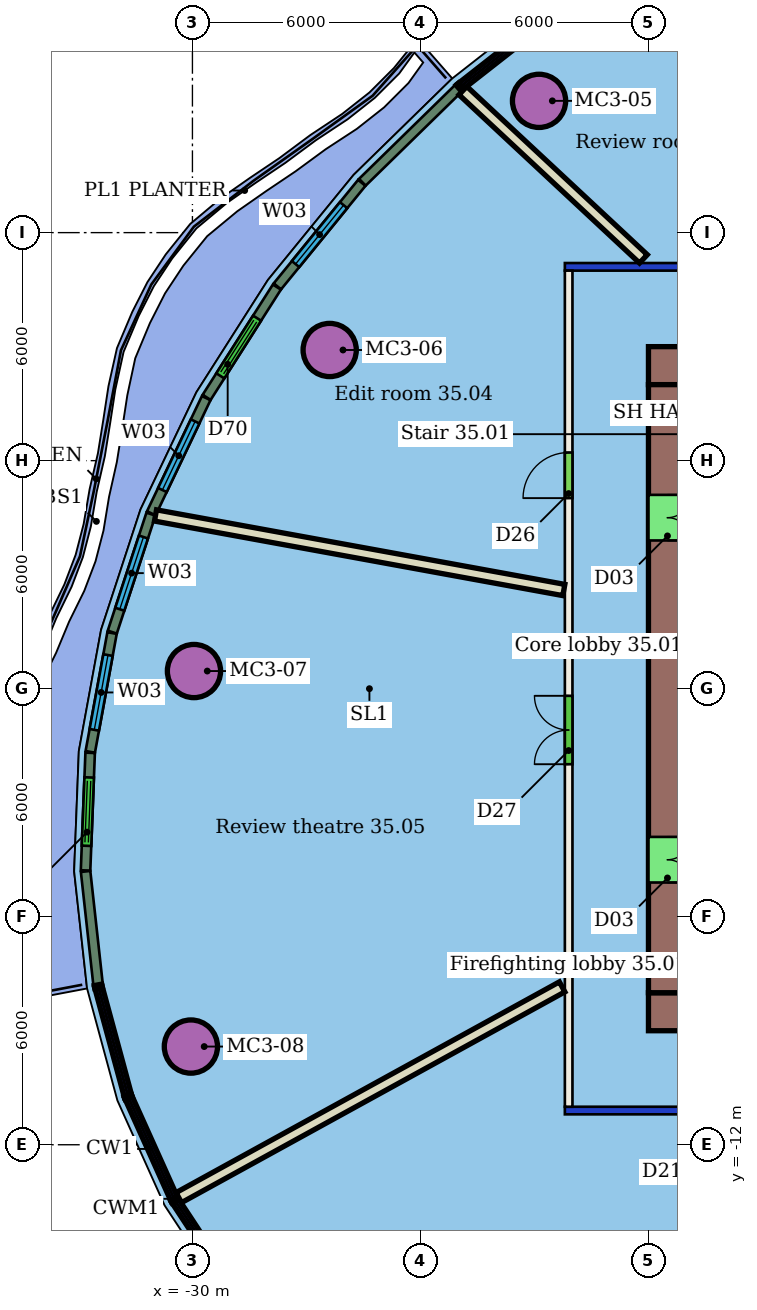
"""IFC4 building model, lengths in metres.
Left out: names, types, materials, properties, quantities, classifications, styles, units other than length and angle.
Written with IfcOpenShell. Run it as: python <this file> out.ifc"""

import sys

from ifc_helpers import new_model, si_unit, direction, frame, frame_2d, origin, origin_2d, place, context, subcontext, project, spatial, rectangle, hollow_circle, extrude, element, fill, save


model = new_model("IFC4")
c1 = context("Model", 3, precision=1e-05, world=origin(), true_north=direction((0.0, 1.0)))
c2 = subcontext(c1, "Body", "Model", "MODEL_VIEW")
j1 = project(units=[si_unit("LENGTHUNIT", "METRE"), si_unit("PLANEANGLEUNIT", "RADIAN")], contexts=[c1])
p1 = place(None, origin())
s1 = spatial("IfcSite", under=j1, at=p1, CompositionType="ELEMENT")
p2 = place(p1, origin())
s2 = spatial("IfcBuilding", under=s1, at=p2, CompositionType="ELEMENT")
p3 = place(p2, frame((0.0, 0.0, 150.6)))
s3 = spatial("IfcBuildingStorey", under=s2, at=p3, CompositionType="ELEMENT", Elevation=150.6)
for number, where, z_axis, x_axis in (
    (1, (-20.879, 15.467, 0.0), (0.0, 0.0, 1.0), (1.0, 0.0, 0.0)),
    (2, (-26.388, 8.912, 0.0), (0.0, 0.0, 1.0), (1.0, 0.0, 0.0)),
    (3, (-29.959, 0.464, 0.0), (0.0, 0.0, 1.0), (1.0, 0.0, 0.0)),
    (4, (-30.041, -9.417, 0.0), (0.0, 0.0, 1.0), (1.0, 0.0, 0.0)),
):
    element("IfcColumn", number, at=place(p3, frame(where, z_axis=z_axis, x_axis=x_axis)), inside=s3, PredefinedType="COLUMN", context=c2, shape_type="SweptSolid", body=[
        extrude(hollow_circle(Radius=0.7, WallThickness=0.05, at=origin_2d()), origin(), (0.0, 0.0, 1.0), 3.45),
    ])
p4 = place(p3, frame((8.2, -11.1, 0.0), z_axis=(0.0, 0.0, 1.0), x_axis=(-1.0, 0.0, 0.0)))
e5 = element("IfcWall", 5, at=p4, inside=s3, PredefinedType="PARTITIONING", context=c2, shape_type="SweptSolid", body=[
    extrude(rectangle(XDim=28.4, YDim=0.2, at=frame_2d((14.2, 0.0))), origin(), (0.0, 0.0, 1.0), 3.05),
])
p5 = place(p4, frame((22.505, 0.0, 0.0)))
e6 = element("IfcOpeningElement", 6, at=p5, cuts=e5, PredefinedType="OPENING", context=c2, shape_type="SweptSolid", body=[
    extrude(rectangle(XDim=1.8, YDim=2.1, at=frame_2d((0.9, 1.05))), frame((0.0, 0.11, 0.0), z_axis=(0.0, -1.0, 0.0), x_axis=(1.0, 0.0, 0.0)), (0.0, 0.0, 1.0), 0.22),
])
p6 = place(p4, frame((17.127, 0.0, 0.0)))
e7 = element("IfcOpeningElement", 7, at=p6, cuts=e5, PredefinedType="OPENING", context=c2, shape_type="SweptSolid", body=[
    extrude(rectangle(XDim=0.9, YDim=2.1, at=frame_2d((0.45, 1.05))), frame((0.0, 0.11, 0.0), z_axis=(0.0, -1.0, 0.0), x_axis=(1.0, 0.0, 0.0)), (0.0, 0.0, 1.0), 0.22),
])
p7 = place(p4, frame((7.291, 0.0, 0.0)))
e8 = element("IfcOpeningElement", 8, at=p7, cuts=e5, PredefinedType="OPENING", context=c2, shape_type="SweptSolid", body=[
    extrude(rectangle(XDim=1.2, YDim=2.1, at=frame_2d((0.6, 1.05))), frame((0.0, 0.11, 0.0), z_axis=(0.0, -1.0, 0.0), x_axis=(1.0, 0.0, 0.0)), (0.0, 0.0, 1.0), 0.22),
])
p8 = place(p3, frame((-20.1, -11.0, 0.0), z_axis=(0.0, 0.0, 1.0), x_axis=(0.0, 1.0, 0.0)))
e9 = element("IfcWall", 9, at=p8, inside=s3, PredefinedType="PARTITIONING", context=c2, shape_type="SweptSolid", body=[
    extrude(rectangle(XDim=22.0, YDim=0.2, at=frame_2d((11.0, 0.0))), origin(), (0.0, 0.0, 1.0), 3.45),
])
p9 = place(p8, frame((16.014, 0.0, 0.0)))
e10 = element("IfcOpeningElement", 10, at=p9, cuts=e9, PredefinedType="OPENING", context=c2, shape_type="SweptSolid", body=[
    extrude(rectangle(XDim=1.2, YDim=2.1, at=frame_2d((0.6, 1.05))), frame((0.0, 0.11, 0.0), z_axis=(0.0, -1.0, 0.0), x_axis=(1.0, 0.0, 0.0)), (0.0, 0.0, 1.0), 0.22),
])
p10 = place(p8, frame((9.012, 0.0, 0.0)))
e11 = element("IfcOpeningElement", 11, at=p10, cuts=e9, PredefinedType="OPENING", context=c2, shape_type="SweptSolid", body=[
    extrude(rectangle(XDim=1.8, YDim=2.4, at=frame_2d((0.9, 1.2))), frame((0.0, 0.11, 0.0), z_axis=(0.0, -1.0, 0.0), x_axis=(1.0, 0.0, 0.0)), (0.0, 0.0, 1.0), 0.22),
])
p11 = place(p3, frame((-20.2, 11.1, 0.0), z_axis=(0.0, 0.0, 1.0), x_axis=(1.0, 0.0, 0.0)))
e12 = element("IfcWall", 12, at=p11, inside=s3, PredefinedType="PARTITIONING", context=c2, shape_type="SweptSolid", body=[
    extrude(rectangle(XDim=28.4, YDim=0.2, at=frame_2d((14.2, 0.0))), origin(), (0.0, 0.0, 1.0), 3.05),
])
p12 = place(p11, frame((20.358, 0.0, 0.0)))
e13 = element("IfcOpeningElement", 13, at=p12, cuts=e12, PredefinedType="OPENING", context=c2, shape_type="SweptSolid", body=[
    extrude(rectangle(XDim=1.1, YDim=2.1, at=frame_2d((0.55, 1.05))), frame((0.0, 0.11, 0.0), z_axis=(0.0, -1.0, 0.0), x_axis=(1.0, 0.0, 0.0)), (0.0, 0.0, 1.0), 0.22),
])
p13 = place(p11, frame((10.659, 0.0, 0.0)))
e14 = element("IfcOpeningElement", 14, at=p13, cuts=e12, PredefinedType="OPENING", context=c2, shape_type="SweptSolid", body=[
    extrude(rectangle(XDim=1.0, YDim=2.1, at=frame_2d((0.5, 1.05))), frame((0.0, 0.11, 0.0), z_axis=(0.0, -1.0, 0.0), x_axis=(1.0, 0.0, 0.0)), (0.0, 0.0, 1.0), 0.22),
])
p14 = place(p11, frame((5.245, 0.0, 0.0)))
e15 = element("IfcOpeningElement", 15, at=p14, cuts=e12, PredefinedType="OPENING", context=c2, shape_type="SweptSolid", body=[
    extrude(rectangle(XDim=1.2, YDim=2.1, at=frame_2d((0.6, 1.05))), frame((0.0, 0.11, 0.0), z_axis=(0.0, -1.0, 0.0), x_axis=(1.0, 0.0, 0.0)), (0.0, 0.0, 1.0), 0.22),
])
p15 = place(p3, frame((-22.883, 15.737, 0.0), z_axis=(0.0, 0.0, 1.0), x_axis=(0.731506509166, -0.681834457217, 0.0)))
e16 = element("IfcWall", 16, at=p15, inside=s3, PredefinedType="PARTITIONING", context=c2, shape_type="SweptSolid", body=[
    extrude(rectangle(XDim=6.493, YDim=0.3, at=frame_2d((3.246, 0.0))), origin(), (0.0, 0.0, 1.0), 3.45),
])
p16 = place(p3, frame((-30.972, 4.558, 0.0), z_axis=(0.0, 0.0, 1.0), x_axis=(0.983747727231, -0.179556144892, 0.0)))
e17 = element("IfcWall", 17, at=p16, inside=s3, PredefinedType="PARTITIONING", context=c2, shape_type="SweptSolid", body=[
    extrude(rectangle(XDim=10.922, YDim=0.3, at=frame_2d((5.461, 0.0))), origin(), (0.0, 0.0, 1.0), 3.45),
])
p17 = place(p3, frame((-30.359, -13.392, 0.0), z_axis=(0.0, 0.0, 1.0), x_axis=(0.876308586889, 0.481750205547, 0.0)))
e18 = element("IfcWall", 18, at=p17, inside=s3, PredefinedType="PARTITIONING", context=c2, shape_type="SweptSolid", body=[
    extrude(rectangle(XDim=11.511, YDim=0.3, at=frame_2d((5.755, 0.0))), origin(), (0.0, 0.0, 1.0), 3.45),
])
p18 = place(p3, frame((-18.707, -22.72, 0.0), z_axis=(0.0, 0.0, 1.0), x_axis=(0.488112856121, 0.872780522061, 0.0)))
e19 = element("IfcWall", 19, at=p18, inside=s3, PredefinedType="PARTITIONING", context=c2, shape_type="SweptSolid", body=[
    extrude(rectangle(XDim=13.157, YDim=0.15, at=frame_2d((6.579, 0.0))), origin(), (0.0, 0.0, 1.0), 3.45),
])
p19 = place(p3, frame((-23.005, 15.792, 0.0), z_axis=(0.0, 0.0, 1.0), x_axis=(-0.715154193922, -0.698966722324, 0.0)))
e20 = element("IfcWall", 20, at=p19, inside=s3, PredefinedType="SOLIDWALL", context=c2, shape_type="SweptSolid", body=[
    extrude(rectangle(XDim=3.529, YDim=0.25, at=frame_2d((1.765, 0.0))), origin(), (0.0, 0.0, 1.0), 3.1),
])
p20 = place(p3, frame((-25.543, 13.31, 0.0), z_axis=(0.0, 0.0, 1.0), x_axis=(-0.631962066668, -0.774999320188, 0.0)))
e21 = element("IfcWall", 21, at=p20, inside=s3, PredefinedType="SOLIDWALL", context=c2, shape_type="SweptSolid", body=[
    extrude(rectangle(XDim=3.514, YDim=0.25, at=frame_2d((1.757, 0.0))), origin(), (0.0, 0.0, 1.0), 3.1),
])
p21 = place(p20, frame((0.757, 0.0, 0.9)))
e22 = element("IfcOpeningElement", 22, at=p21, cuts=e21, PredefinedType="OPENING", context=c2, shape_type="SweptSolid", body=[
    extrude(rectangle(XDim=2.0, YDim=2.1, at=frame_2d((1.0, 1.05))), frame((0.0, 0.135, 0.0), z_axis=(0.0, -1.0, 0.0), x_axis=(1.0, 0.0, 0.0)), (0.0, 0.0, 1.0), 0.27),
])
p22 = place(p3, frame((-27.778, 10.568, 0.0), z_axis=(0.0, 0.0, 1.0), x_axis=(-0.537256497047, -0.843418909191, 0.0)))
e23 = element("IfcWall", 23, at=p22, inside=s3, PredefinedType="SOLIDWALL", context=c2, shape_type="SweptSolid", body=[
    extrude(rectangle(XDim=3.441, YDim=0.25, at=frame_2d((1.72, 0.0))), origin(), (0.0, 0.0, 1.0), 3.1),
])
p23 = place(p22, frame((0.97, 0.0, 0.0)))
e24 = element("IfcOpeningElement", 24, at=p23, cuts=e23, PredefinedType="OPENING", context=c2, shape_type="SweptSolid", body=[
    extrude(rectangle(XDim=1.8, YDim=2.4, at=frame_2d((0.9, 1.2))), frame((0.0, 0.135, 0.0), z_axis=(0.0, -1.0, 0.0), x_axis=(1.0, 0.0, 0.0)), (0.0, 0.0, 1.0), 0.27),
])
p24 = place(p3, frame((-29.638, 7.645, 0.0), z_axis=(0.0, 0.0, 1.0), x_axis=(-0.430495314567, -0.902592811923, 0.0)))
e25 = element("IfcWall", 25, at=p24, inside=s3, PredefinedType="SOLIDWALL", context=c2, shape_type="SweptSolid", body=[
    extrude(rectangle(XDim=3.357, YDim=0.25, at=frame_2d((1.678, 0.0))), origin(), (0.0, 0.0, 1.0), 3.1),
])
p25 = place(p24, frame((0.678, 0.0, 0.9)))
e26 = element("IfcOpeningElement", 26, at=p25, cuts=e25, PredefinedType="OPENING", context=c2, shape_type="SweptSolid", body=[
    extrude(rectangle(XDim=2.0, YDim=2.1, at=frame_2d((1.0, 1.05))), frame((0.0, 0.135, 0.0), z_axis=(0.0, -1.0, 0.0), x_axis=(1.0, 0.0, 0.0)), (0.0, 0.0, 1.0), 0.27),
])
p26 = place(p3, frame((-31.092, 4.593, 0.0), z_axis=(0.0, 0.0, 1.0), x_axis=(-0.311426794422, -0.950270146704, 0.0)))
e27 = element("IfcWall", 27, at=p26, inside=s3, PredefinedType="SOLIDWALL", context=c2, shape_type="SweptSolid", body=[
    extrude(rectangle(XDim=3.268, YDim=0.25, at=frame_2d((1.634, 0.0))), origin(), (0.0, 0.0, 1.0), 3.1),
])
p27 = place(p26, frame((0.634, 0.0, 0.9)))
e28 = element("IfcOpeningElement", 28, at=p27, cuts=e27, PredefinedType="OPENING", context=c2, shape_type="SweptSolid", body=[
    extrude(rectangle(XDim=2.0, YDim=2.1, at=frame_2d((1.0, 1.05))), frame((0.0, 0.135, 0.0), z_axis=(0.0, -1.0, 0.0), x_axis=(1.0, 0.0, 0.0)), (0.0, 0.0, 1.0), 0.27),
])
p28 = place(p3, frame((-32.115, 1.464, 0.0), z_axis=(0.0, 0.0, 1.0), x_axis=(-0.18041951624, -0.983589750943, 0.0)))
e29 = element("IfcWall", 29, at=p28, inside=s3, PredefinedType="SOLIDWALL", context=c2, shape_type="SweptSolid", body=[
    extrude(rectangle(XDim=3.179, YDim=0.25, at=frame_2d((1.589, 0.0))), origin(), (0.0, 0.0, 1.0), 3.1),
])
p29 = place(p28, frame((0.589, 0.0, 0.9)))
e30 = element("IfcOpeningElement", 30, at=p29, cuts=e29, PredefinedType="OPENING", context=c2, shape_type="SweptSolid", body=[
    extrude(rectangle(XDim=2.0, YDim=2.1, at=frame_2d((1.0, 1.05))), frame((0.0, 0.135, 0.0), z_axis=(0.0, -1.0, 0.0), x_axis=(1.0, 0.0, 0.0)), (0.0, 0.0, 1.0), 0.27),
])
p30 = place(p3, frame((-32.691, -1.688, 0.0), z_axis=(0.0, 0.0, 1.0), x_axis=(-0.039102222246, -0.99923521566, 0.0)))
e31 = element("IfcWall", 31, at=p30, inside=s3, PredefinedType="SOLIDWALL", context=c2, shape_type="SweptSolid", body=[
    extrude(rectangle(XDim=3.097, YDim=0.25, at=frame_2d((1.548, 0.0))), origin(), (0.0, 0.0, 1.0), 3.1),
])
p31 = place(p30, frame((0.648, 0.0, 0.0)))
e32 = element("IfcOpeningElement", 32, at=p31, cuts=e31, PredefinedType="OPENING", context=c2, shape_type="SweptSolid", body=[
    extrude(rectangle(XDim=1.8, YDim=2.4, at=frame_2d((0.9, 1.2))), frame((0.0, 0.135, 0.0), z_axis=(0.0, -1.0, 0.0), x_axis=(1.0, 0.0, 0.0)), (0.0, 0.0, 1.0), 0.27),
])
p32 = place(p3, frame((-32.812, -4.809, 0.0), z_axis=(0.0, 0.0, 1.0), x_axis=(0.109695830788, -0.993965202966, 0.0)))
e33 = element("IfcWall", 33, at=p32, inside=s3, PredefinedType="SOLIDWALL", context=c2, shape_type="SweptSolid", body=[
    extrude(rectangle(XDim=2.987, YDim=0.25, at=frame_2d((1.493, 0.0))), origin(), (0.0, 0.0, 1.0), 3.1),
])
p33 = place(p3, frame((-6.0, 8.5, 0.0), z_axis=(0.0, 0.0, 1.0), x_axis=(-1.0, 0.0, 0.0)))
e34 = element("IfcWall", 34, at=p33, inside=s3, PredefinedType="SHEAR", context=c2, shape_type="SweptSolid", body=[
    extrude(rectangle(XDim=12.0, YDim=1.0, at=frame_2d((6.0, 0.0))), origin(), (0.0, 0.0, 1.0), 3.3),
])
p34 = place(p33, frame((5.2, 0.0, 0.0)))
e35 = element("IfcOpeningElement", 35, at=p34, cuts=e34, PredefinedType="OPENING", context=c2, shape_type="SweptSolid", body=[
    extrude(rectangle(XDim=1.2, YDim=2.1, at=frame_2d((0.6, 1.05))), frame((0.0, 0.51, 0.0), z_axis=(0.0, -1.0, 0.0), x_axis=(1.0, 0.0, 0.0)), (0.0, 0.0, 1.0), 1.02),
])
p35 = place(p3, frame((-18.0, -8.5, 0.0), z_axis=(0.0, 0.0, 1.0), x_axis=(1.0, 0.0, 0.0)))
e36 = element("IfcWall", 36, at=p35, inside=s3, PredefinedType="SHEAR", context=c2, shape_type="SweptSolid", body=[
    extrude(rectangle(XDim=24.0, YDim=1.0, at=frame_2d((12.0, 0.0))), origin(), (0.0, 0.0, 1.0), 3.3),
])
p36 = place(p35, frame((6.0, 0.0, 0.0)))
e37 = element("IfcOpeningElement", 37, at=p36, cuts=e36, PredefinedType="OPENING", context=c2, shape_type="SweptSolid", body=[
    extrude(rectangle(XDim=1.2, YDim=2.1, at=frame_2d((0.6, 1.05))), frame((0.0, 0.51, 0.0), z_axis=(0.0, -1.0, 0.0), x_axis=(1.0, 0.0, 0.0)), (0.0, 0.0, 1.0), 1.02),
])
p37 = place(p3, frame((-17.5, 8.0, 0.0), z_axis=(0.0, 0.0, 1.0), x_axis=(0.0, -1.0, 0.0)))
e38 = element("IfcWall", 38, at=p37, inside=s3, PredefinedType="SHEAR", context=c2, shape_type="SweptSolid", body=[
    extrude(rectangle(XDim=16.0, YDim=1.0, at=frame_2d((8.0, 0.0))), origin(), (0.0, 0.0, 1.0), 3.3),
])
p38 = place(p37, frame((11.9, 0.0, 0.0)))
e39 = element("IfcOpeningElement", 39, at=p38, cuts=e38, PredefinedType="OPENING", context=c2, shape_type="SweptSolid", body=[
    extrude(rectangle(XDim=1.2, YDim=2.1, at=frame_2d((0.6, 1.05))), frame((0.0, 0.51, 0.0), z_axis=(0.0, -1.0, 0.0), x_axis=(1.0, 0.0, 0.0)), (0.0, 0.0, 1.0), 1.02),
])
p39 = place(p37, frame((2.9, 0.0, 0.0)))
e40 = element("IfcOpeningElement", 40, at=p39, cuts=e38, PredefinedType="OPENING", context=c2, shape_type="SweptSolid", body=[
    extrude(rectangle(XDim=1.2, YDim=2.1, at=frame_2d((0.6, 1.05))), frame((0.0, 0.51, 0.0), z_axis=(0.0, -1.0, 0.0), x_axis=(1.0, 0.0, 0.0)), (0.0, 0.0, 1.0), 1.02),
])
p40 = place(p9, origin())
e41 = element("IfcDoor", 41, at=p40, inside=s3, OperationType="SINGLE_SWING_LEFT", PredefinedType="DOOR", context=c2, shape_type="SweptSolid", body=[
    extrude(rectangle(XDim=1.2, YDim=2.1, at=frame_2d((0.6, 1.05))), frame((0.0, 0.025, 0.0), z_axis=(0.0, -1.0, 0.0), x_axis=(1.0, 0.0, 0.0)), (0.0, 0.0, 1.0), 0.05),
])
fill(e10, e41)
p41 = place(p10, origin())
e42 = element("IfcDoor", 42, at=p41, inside=s3, OperationType="DOUBLE_DOOR_SINGLE_SWING", PredefinedType="DOOR", context=c2, shape_type="SweptSolid", body=[
    extrude(rectangle(XDim=1.8, YDim=2.4, at=frame_2d((0.9, 1.2))), frame((0.0, 0.025, 0.0), z_axis=(0.0, -1.0, 0.0), x_axis=(1.0, 0.0, 0.0)), (0.0, 0.0, 1.0), 0.05),
])
fill(e11, e42)
p42 = place(p21, origin())
e43 = element("IfcWindow", 43, at=p42, inside=s3, PartitioningType="SINGLE_PANEL", PredefinedType="WINDOW", context=c2, shape_type="SweptSolid", body=[
    extrude(rectangle(XDim=2.0, YDim=2.1, at=frame_2d((1.0, 1.05))), frame((0.0, 0.03, 0.0), z_axis=(0.0, -1.0, 0.0), x_axis=(1.0, 0.0, 0.0)), (0.0, 0.0, 1.0), 0.06),
])
fill(e22, e43)
p43 = place(p23, origin())
e44 = element("IfcDoor", 44, at=p43, inside=s3, OperationType="DOUBLE_DOOR_SLIDING", PredefinedType="DOOR", context=c2, shape_type="SweptSolid", body=[
    extrude(rectangle(XDim=1.8, YDim=2.4, at=frame_2d((0.9, 1.2))), frame((0.0, 0.025, 0.0), z_axis=(0.0, -1.0, 0.0), x_axis=(1.0, 0.0, 0.0)), (0.0, 0.0, 1.0), 0.05),
])
fill(e24, e44)
p44 = place(p25, origin())
e45 = element("IfcWindow", 45, at=p44, inside=s3, PartitioningType="SINGLE_PANEL", PredefinedType="WINDOW", context=c2, shape_type="SweptSolid", body=[
    extrude(rectangle(XDim=2.0, YDim=2.1, at=frame_2d((1.0, 1.05))), frame((0.0, 0.03, 0.0), z_axis=(0.0, -1.0, 0.0), x_axis=(1.0, 0.0, 0.0)), (0.0, 0.0, 1.0), 0.06),
])
fill(e26, e45)
p45 = place(p27, origin())
e46 = element("IfcWindow", 46, at=p45, inside=s3, PartitioningType="SINGLE_PANEL", PredefinedType="WINDOW", context=c2, shape_type="SweptSolid", body=[
    extrude(rectangle(XDim=2.0, YDim=2.1, at=frame_2d((1.0, 1.05))), frame((0.0, 0.03, 0.0), z_axis=(0.0, -1.0, 0.0), x_axis=(1.0, 0.0, 0.0)), (0.0, 0.0, 1.0), 0.06),
])
fill(e28, e46)
p46 = place(p29, origin())
e47 = element("IfcWindow", 47, at=p46, inside=s3, PartitioningType="SINGLE_PANEL", PredefinedType="WINDOW", context=c2, shape_type="SweptSolid", body=[
    extrude(rectangle(XDim=2.0, YDim=2.1, at=frame_2d((1.0, 1.05))), frame((0.0, 0.03, 0.0), z_axis=(0.0, -1.0, 0.0), x_axis=(1.0, 0.0, 0.0)), (0.0, 0.0, 1.0), 0.06),
])
fill(e30, e47)
p47 = place(p31, origin())
e48 = element("IfcDoor", 48, at=p47, inside=s3, OperationType="DOUBLE_DOOR_SLIDING", PredefinedType="DOOR", context=c2, shape_type="SweptSolid", body=[
    extrude(rectangle(XDim=1.8, YDim=2.4, at=frame_2d((0.9, 1.2))), frame((0.0, 0.025, 0.0), z_axis=(0.0, -1.0, 0.0), x_axis=(1.0, 0.0, 0.0)), (0.0, 0.0, 1.0), 0.05),
])
fill(e32, e48)
p48 = place(p38, origin())
e49 = element("IfcDoor", 49, at=p48, inside=s3, OperationType="DOUBLE_DOOR_SINGLE_SWING", PredefinedType="NOTDEFINED", context=c2, shape_type="SweptSolid", body=[
    extrude(rectangle(XDim=1.2, YDim=2.1, at=frame_2d((0.6, 1.05))), frame((0.0, 0.025, 0.0), z_axis=(0.0, -1.0, 0.0), x_axis=(1.0, 0.0, 0.0)), (0.0, 0.0, 1.0), 0.05),
])
fill(e39, e49)
p49 = place(p39, origin())
e50 = element("IfcDoor", 50, at=p49, inside=s3, OperationType="DOUBLE_DOOR_SINGLE_SWING", PredefinedType="NOTDEFINED", context=c2, shape_type="SweptSolid", body=[
    extrude(rectangle(XDim=1.2, YDim=2.1, at=frame_2d((0.6, 1.05))), frame((0.0, 0.025, 0.0), z_axis=(0.0, -1.0, 0.0), x_axis=(1.0, 0.0, 0.0)), (0.0, 0.0, 1.0), 0.05),
])
fill(e40, e50)
save(model, sys.argv[1])
